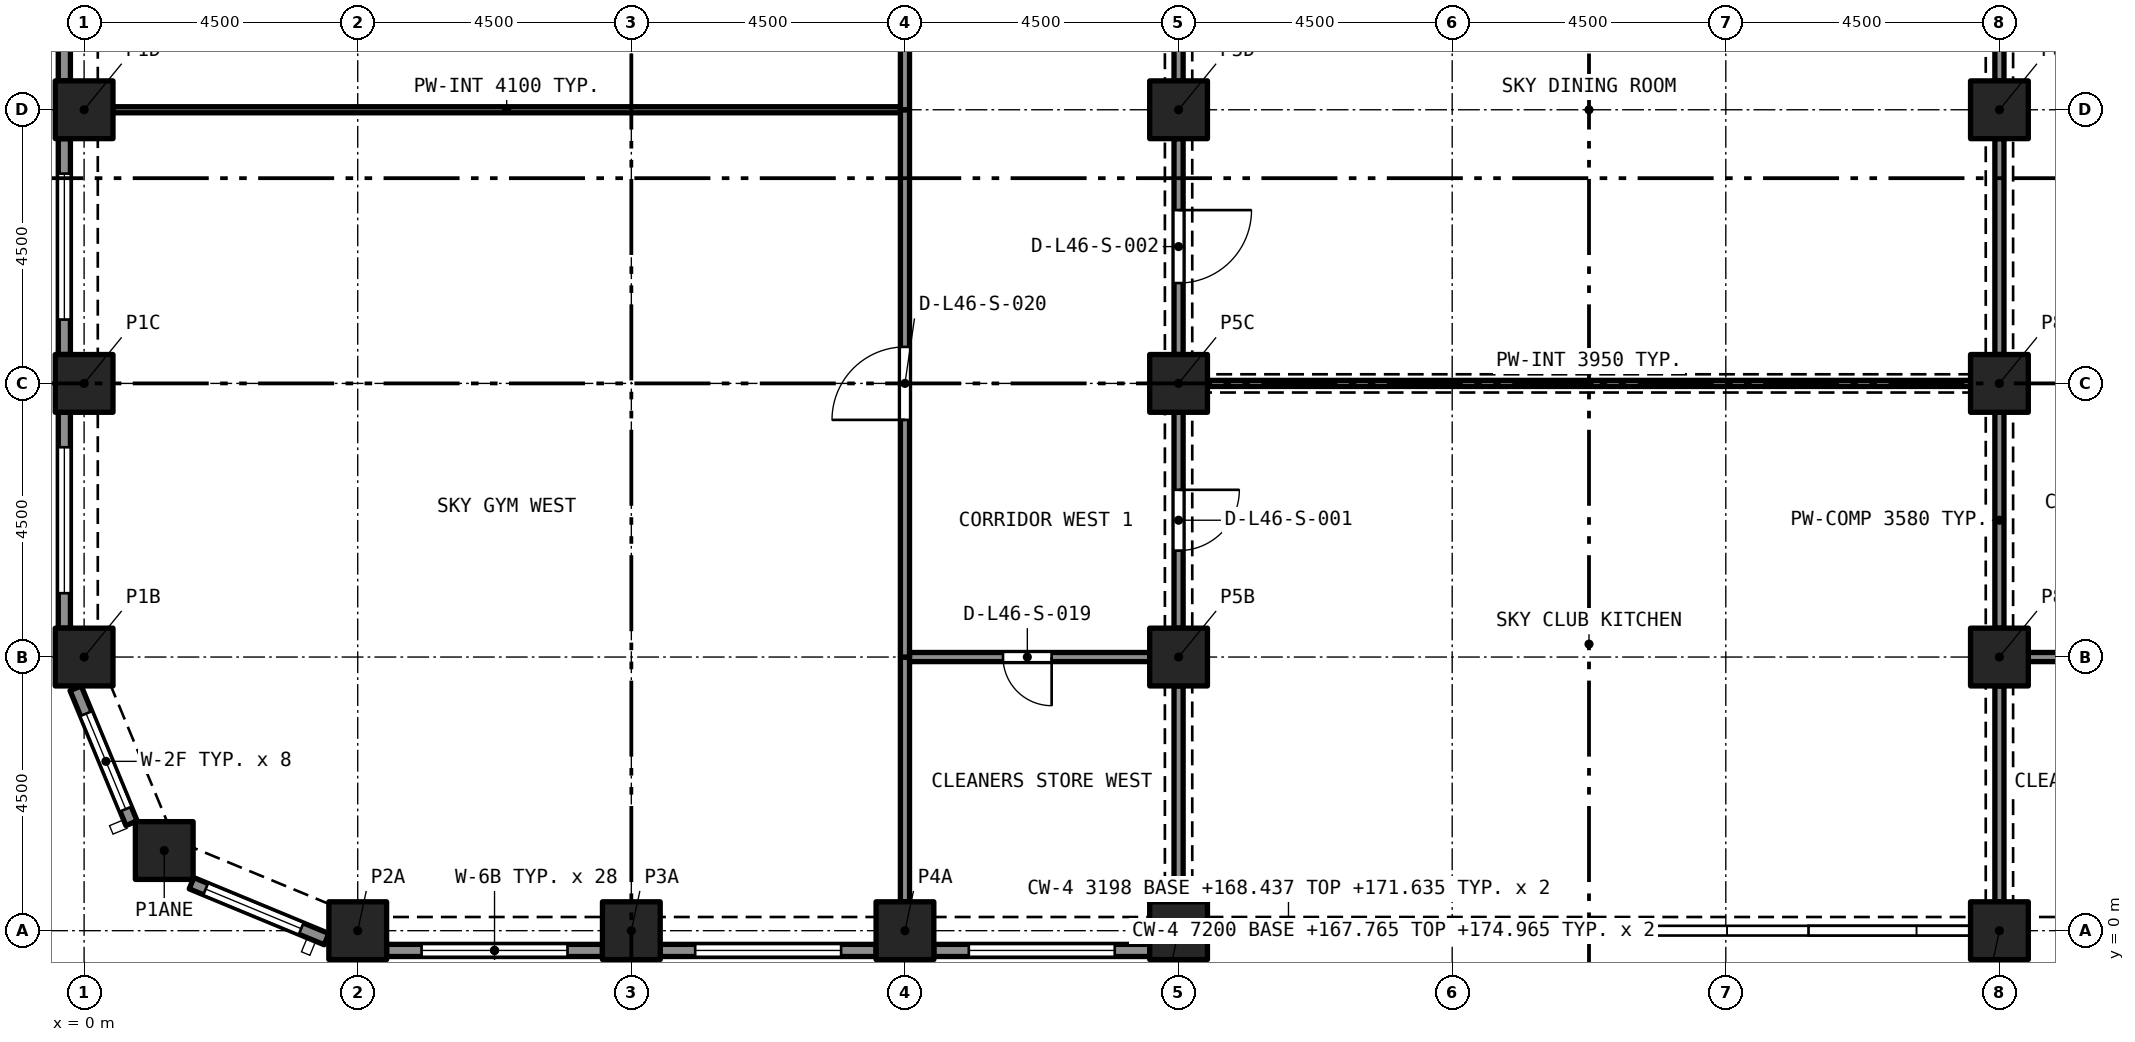
"""IFC4 building model, lengths in metres.
Left out: names, types, materials, properties, quantities, classifications, styles, units other than length and angle.
Written with IfcOpenShell. Run it as: python <this file> out.ifc"""

import sys

from ifc_helpers import new_model, si_unit, direction, frame, frame_2d, origin, origin_2d, place, context, subcontext, project, spatial, rectangle, extrude, element, fill, save


model = new_model("IFC4")
c1 = context("Model", 3, precision=1e-05, world=origin(), true_north=direction((0.0, 1.0)))
c2 = subcontext(c1, "Body", "Model", "MODEL_VIEW")
j1 = project(units=[si_unit("LENGTHUNIT", "METRE"), si_unit("PLANEANGLEUNIT", "RADIAN")], contexts=[c1])
p1 = place(None, origin())
s1 = spatial("IfcSite", under=j1, at=p1, CompositionType="ELEMENT")
p2 = place(p1, origin())
s2 = spatial("IfcBuilding", under=s1, at=p2, CompositionType="ELEMENT")
p3 = place(p2, frame((0.0, 0.0, 168.2)))
s3 = spatial("IfcBuildingStorey", under=s2, at=p3, CompositionType="ELEMENT", Elevation=168.2)
for number, where, z_axis, x_axis in (
    (1, (4.5, 0.0, 0.0), (0.0, 0.0, 1.0), (1.0, 0.0, 0.0)),
    (2, (9.0, 0.0, 0.0), (0.0, 0.0, 1.0), (1.0, 0.0, 0.0)),
    (3, (13.5, 0.0, 0.0), (0.0, 0.0, 1.0), (1.0, 0.0, 0.0)),
    (4, (18.0, 0.0, 0.0), (0.0, 0.0, 1.0), (1.0, 0.0, 0.0)),
    (5, (31.5, 0.0, 0.0), (0.0, 0.0, 1.0), (1.0, 0.0, 0.0)),
    (6, (1.318, 1.318, 0.0), (0.0, 0.0, 1.0), (1.0, 0.0, 0.0)),
    (7, (0.0, 4.5, 0.0), (0.0, 0.0, 1.0), (1.0, 0.0, 0.0)),
    (8, (18.0, 4.5, 0.0), (0.0, 0.0, 1.0), (1.0, 0.0, 0.0)),
    (9, (31.5, 4.5, 0.0), (0.0, 0.0, 1.0), (1.0, 0.0, 0.0)),
    (10, (0.0, 9.0, 0.0), (0.0, 0.0, 1.0), (1.0, 0.0, 0.0)),
    (11, (18.0, 9.0, 0.0), (0.0, 0.0, 1.0), (1.0, 0.0, 0.0)),
    (12, (31.5, 9.0, 0.0), (0.0, 0.0, 1.0), (1.0, 0.0, 0.0)),
    (13, (0.0, 13.5, 0.0), (0.0, 0.0, 1.0), (1.0, 0.0, 0.0)),
    (14, (18.0, 13.5, 0.0), (0.0, 0.0, 1.0), (1.0, 0.0, 0.0)),
    (15, (31.5, 13.5, 0.0), (0.0, 0.0, 1.0), (1.0, 0.0, 0.0)),
):
    element("IfcColumn", number, at=place(p3, frame(where, z_axis=z_axis, x_axis=x_axis)), inside=s3, PredefinedType="COLUMN", context=c2, shape_type="SweptSolid", body=[
        extrude(rectangle(XDim=0.95, YDim=0.95, at=origin_2d()), origin(), (0.0, 0.0, 1.0), 4.4),
    ])
p4 = place(p3, frame((0.78, 1.767, 0.0), z_axis=(0.0, 0.0, 1.0), x_axis=(-0.382680855588, 0.923880599843, 0.0)))
e16 = element("IfcWall", 16, at=p4, inside=s3, PredefinedType="SOLIDWALL", context=c2, shape_type="SweptSolid", body=[
    extrude(rectangle(XDim=2.403, YDim=0.2, at=frame_2d((1.201, 0.0))), origin(), (0.0, 0.0, 1.0), 4.4),
])
p5 = place(p4, frame((0.251, 0.0, 0.45)))
e17 = element("IfcOpeningElement", 17, at=p5, cuts=e16, PredefinedType="OPENING", context=c2, shape_type="SweptSolid", body=[
    extrude(rectangle(XDim=1.7, YDim=2.55, at=frame_2d((0.85, 1.275))), frame((0.0, 0.11, 0.0), z_axis=(0.0, -1.0, 0.0), x_axis=(1.0, 0.0, 0.0)), (0.0, 0.0, 1.0), 0.22),
])
p6 = place(p3, frame((3.987, -0.139, 0.0), z_axis=(0.0, 0.0, 1.0), x_axis=(-0.923880599843, 0.382680855588, 0.0)))
e18 = element("IfcWall", 18, at=p6, inside=s3, PredefinedType="SOLIDWALL", context=c2, shape_type="SweptSolid", body=[
    extrude(rectangle(XDim=2.403, YDim=0.2, at=frame_2d((1.201, 0.0))), origin(), (0.0, 0.0, 1.0), 4.4),
])
p7 = place(p6, frame((0.451, 0.0, 0.45)))
e19 = element("IfcOpeningElement", 19, at=p7, cuts=e18, PredefinedType="OPENING", context=c2, shape_type="SweptSolid", body=[
    extrude(rectangle(XDim=1.7, YDim=2.55, at=frame_2d((0.85, 1.275))), frame((0.0, 0.11, 0.0), z_axis=(0.0, -1.0, 0.0), x_axis=(1.0, 0.0, 0.0)), (0.0, 0.0, 1.0), 0.22),
])
p8 = place(p3, frame((8.525, -0.325, 0.0), z_axis=(0.0, 0.0, 1.0), x_axis=(-1.0, 0.0, 0.0)))
e20 = element("IfcWall", 20, at=p8, inside=s3, PredefinedType="SOLIDWALL", context=c2, shape_type="SweptSolid", body=[
    extrude(rectangle(XDim=3.55, YDim=0.2, at=frame_2d((1.775, 0.0))), origin(), (0.0, 0.0, 1.0), 4.4),
])
p9 = place(p8, frame((0.575, 0.0, 0.45)))
e21 = element("IfcOpeningElement", 21, at=p9, cuts=e20, PredefinedType="OPENING", context=c2, shape_type="SweptSolid", body=[
    extrude(rectangle(XDim=2.4, YDim=2.55, at=frame_2d((1.2, 1.275))), frame((0.0, 0.11, 0.0), z_axis=(0.0, -1.0, 0.0), x_axis=(1.0, 0.0, 0.0)), (0.0, 0.0, 1.0), 0.22),
])
p10 = place(p3, frame((13.025, -0.325, 0.0), z_axis=(0.0, 0.0, 1.0), x_axis=(-1.0, 0.0, 0.0)))
e22 = element("IfcWall", 22, at=p10, inside=s3, PredefinedType="SOLIDWALL", context=c2, shape_type="SweptSolid", body=[
    extrude(rectangle(XDim=3.55, YDim=0.2, at=frame_2d((1.775, 0.0))), origin(), (0.0, 0.0, 1.0), 4.4),
])
p11 = place(p10, frame((0.575, 0.0, 0.45)))
e23 = element("IfcOpeningElement", 23, at=p11, cuts=e22, PredefinedType="OPENING", context=c2, shape_type="SweptSolid", body=[
    extrude(rectangle(XDim=2.4, YDim=2.55, at=frame_2d((1.2, 1.275))), frame((0.0, 0.11, 0.0), z_axis=(0.0, -1.0, 0.0), x_axis=(1.0, 0.0, 0.0)), (0.0, 0.0, 1.0), 0.22),
])
p12 = place(p3, frame((17.525, -0.325, 0.0), z_axis=(0.0, 0.0, 1.0), x_axis=(-1.0, 0.0, 0.0)))
e24 = element("IfcWall", 24, at=p12, inside=s3, PredefinedType="SOLIDWALL", context=c2, shape_type="SweptSolid", body=[
    extrude(rectangle(XDim=3.55, YDim=0.2, at=frame_2d((1.775, 0.0))), origin(), (0.0, 0.0, 1.0), 4.4),
])
p13 = place(p12, frame((0.575, 0.0, 0.45)))
e25 = element("IfcOpeningElement", 25, at=p13, cuts=e24, PredefinedType="OPENING", context=c2, shape_type="SweptSolid", body=[
    extrude(rectangle(XDim=2.4, YDim=2.55, at=frame_2d((1.2, 1.275))), frame((0.0, 0.11, 0.0), z_axis=(0.0, -1.0, 0.0), x_axis=(1.0, 0.0, 0.0)), (0.0, 0.0, 1.0), 0.22),
])
p14 = place(p3, frame((-0.325, 13.975, 0.0), z_axis=(0.0, 0.0, 1.0), x_axis=(0.0, 1.0, 0.0)))
e26 = element("IfcWall", 26, at=p14, inside=s3, PredefinedType="SOLIDWALL", context=c2, shape_type="SweptSolid", body=[
    extrude(rectangle(XDim=3.55, YDim=0.2, at=frame_2d((1.775, 0.0))), origin(), (0.0, 0.0, 1.0), 4.4),
])
p15 = place(p14, frame((0.575, 0.0, 0.45)))
e27 = element("IfcOpeningElement", 27, at=p15, cuts=e26, PredefinedType="OPENING", context=c2, shape_type="SweptSolid", body=[
    extrude(rectangle(XDim=2.4, YDim=2.55, at=frame_2d((1.2, 1.275))), frame((0.0, 0.11, 0.0), z_axis=(0.0, -1.0, 0.0), x_axis=(1.0, 0.0, 0.0)), (0.0, 0.0, 1.0), 0.22),
])
p16 = place(p3, frame((-0.325, 9.475, 0.0), z_axis=(0.0, 0.0, 1.0), x_axis=(0.0, 1.0, 0.0)))
e28 = element("IfcWall", 28, at=p16, inside=s3, PredefinedType="SOLIDWALL", context=c2, shape_type="SweptSolid", body=[
    extrude(rectangle(XDim=3.55, YDim=0.2, at=frame_2d((1.775, 0.0))), origin(), (0.0, 0.0, 1.0), 4.4),
])
p17 = place(p16, frame((0.575, 0.0, 0.45)))
e29 = element("IfcOpeningElement", 29, at=p17, cuts=e28, PredefinedType="OPENING", context=c2, shape_type="SweptSolid", body=[
    extrude(rectangle(XDim=2.4, YDim=2.55, at=frame_2d((1.2, 1.275))), frame((0.0, 0.11, 0.0), z_axis=(0.0, -1.0, 0.0), x_axis=(1.0, 0.0, 0.0)), (0.0, 0.0, 1.0), 0.22),
])
p18 = place(p3, frame((-0.325, 4.975, 0.0), z_axis=(0.0, 0.0, 1.0), x_axis=(0.0, 1.0, 0.0)))
e30 = element("IfcWall", 30, at=p18, inside=s3, PredefinedType="SOLIDWALL", context=c2, shape_type="SweptSolid", body=[
    extrude(rectangle(XDim=3.55, YDim=0.2, at=frame_2d((1.775, 0.0))), origin(), (0.0, 0.0, 1.0), 4.4),
])
p19 = place(p18, frame((0.575, 0.0, 0.45)))
e31 = element("IfcOpeningElement", 31, at=p19, cuts=e30, PredefinedType="OPENING", context=c2, shape_type="SweptSolid", body=[
    extrude(rectangle(XDim=2.4, YDim=2.55, at=frame_2d((1.2, 1.275))), frame((0.0, 0.11, 0.0), z_axis=(0.0, -1.0, 0.0), x_axis=(1.0, 0.0, 0.0)), (0.0, 0.0, 1.0), 0.22),
])
p20 = place(p3, frame((18.475, 9.0, 0.0), z_axis=(0.0, 0.0, 1.0), x_axis=(1.0, 0.0, 0.0)))
e32 = element("IfcWall", 32, at=p20, inside=s3, PredefinedType="PARTITIONING", context=c2, shape_type="SweptSolid", body=[
    extrude(rectangle(XDim=12.55, YDim=0.1, at=frame_2d((6.275, 0.0))), origin(), (0.0, 0.0, 1.0), 3.95),
])
for number, where, z_axis, x_axis in (
    (33, (31.5, 0.475, 0.0), (0.0, 0.0, 1.0), (0.0, 1.0, 0.0)),
    (34, (31.5, 4.975, 0.0), (0.0, 0.0, 1.0), (0.0, 1.0, 0.0)),
    (35, (18.0, 0.475, 0.0), (0.0, 0.0, 1.0), (0.0, 1.0, 0.0)),
):
    element("IfcWall", number, at=place(p3, frame(where, z_axis=z_axis, x_axis=x_axis)), inside=s3, PredefinedType="PARTITIONING", context=c2, shape_type="SweptSolid", body=[
        extrude(rectangle(XDim=3.55, YDim=0.15, at=frame_2d((1.775, 0.0))), origin(), (0.0, 0.0, 1.0), 3.58),
    ])
p21 = place(p3, frame((18.0, 8.525, 0.0), z_axis=(0.0, 0.0, 1.0), x_axis=(0.0, -1.0, 0.0)))
e36 = element("IfcWall", 36, at=p21, inside=s3, PredefinedType="PARTITIONING", context=c2, shape_type="SweptSolid", body=[
    extrude(rectangle(XDim=3.55, YDim=0.15, at=frame_2d((1.775, 0.0))), origin(), (0.0, 0.0, 1.0), 3.58),
])
p22 = place(p21, frame((1.275, 0.0, 0.0)))
e37 = element("IfcOpeningElement", 37, at=p22, cuts=e36, PredefinedType="OPENING", context=c2, shape_type="SweptSolid", body=[
    extrude(rectangle(XDim=1.0, YDim=2.1, at=frame_2d((0.5, 1.05))), frame((0.0, 0.085, 0.0), z_axis=(0.0, -1.0, 0.0), x_axis=(1.0, 0.0, 0.0)), (0.0, 0.0, 1.0), 0.17),
])
for number, where, z_axis, x_axis in (
    (38, (31.5, 13.975, 0.0), (0.0, 0.0, 1.0), (0.0, 1.0, 0.0)),
    (39, (31.5, 9.475, 0.0), (0.0, 0.0, 1.0), (0.0, 1.0, 0.0)),
):
    element("IfcWall", number, at=place(p3, frame(where, z_axis=z_axis, x_axis=x_axis)), inside=s3, PredefinedType="PARTITIONING", context=c2, shape_type="SweptSolid", body=[
        extrude(rectangle(XDim=3.55, YDim=0.15, at=frame_2d((1.775, 0.0))), origin(), (0.0, 0.0, 1.0), 3.58),
    ])
p23 = place(p3, frame((18.0, 13.025, 0.0), z_axis=(0.0, 0.0, 1.0), x_axis=(0.0, -1.0, 0.0)))
e40 = element("IfcWall", 40, at=p23, inside=s3, PredefinedType="PARTITIONING", context=c2, shape_type="SweptSolid", body=[
    extrude(rectangle(XDim=3.55, YDim=0.15, at=frame_2d((1.775, 0.0))), origin(), (0.0, 0.0, 1.0), 3.58),
])
p24 = place(p23, frame((1.175, 0.0, 0.0)))
e41 = element("IfcOpeningElement", 41, at=p24, cuts=e40, PredefinedType="OPENING", context=c2, shape_type="SweptSolid", body=[
    extrude(rectangle(XDim=1.2, YDim=2.1, at=frame_2d((0.6, 1.05))), frame((0.0, 0.085, 0.0), z_axis=(0.0, -1.0, 0.0), x_axis=(1.0, 0.0, 0.0)), (0.0, 0.0, 1.0), 0.17),
])
p25 = place(p3, frame((18.0, 13.975, 0.0), z_axis=(0.0, 0.0, 1.0), x_axis=(0.0, 1.0, 0.0)))
e42 = element("IfcWall", 42, at=p25, inside=s3, PredefinedType="PARTITIONING", context=c2, shape_type="SweptSolid", body=[
    extrude(rectangle(XDim=3.55, YDim=0.15, at=frame_2d((1.775, 0.0))), origin(), (0.0, 0.0, 1.0), 3.58),
])
p26 = place(p3, frame((35.925, 4.5, 0.0), z_axis=(0.0, 0.0, 1.0), x_axis=(-1.0, 0.0, 0.0)))
e43 = element("IfcWall", 43, at=p26, inside=s3, PredefinedType="PARTITIONING", context=c2, shape_type="SweptSolid", body=[
    extrude(rectangle(XDim=3.95, YDim=0.15, at=frame_2d((1.975, 0.0))), origin(), (0.0, 0.0, 1.0), 4.1),
])
p27 = place(p26, frame((1.538, 0.0, 0.0)))
e44 = element("IfcOpeningElement", 44, at=p27, cuts=e43, PredefinedType="OPENING", context=c2, shape_type="SweptSolid", body=[
    extrude(rectangle(XDim=0.8, YDim=2.1, at=frame_2d((0.4, 1.05))), frame((0.0, 0.085, 0.0), z_axis=(0.0, -1.0, 0.0), x_axis=(1.0, 0.0, 0.0)), (0.0, 0.0, 1.0), 0.17),
])
p28 = place(p3, frame((13.5, 0.475, 0.0), z_axis=(0.0, 0.0, 1.0), x_axis=(0.0, 1.0, 0.0)))
e45 = element("IfcWall", 45, at=p28, inside=s3, PredefinedType="PARTITIONING", context=c2, shape_type="SweptSolid", body=[
    extrude(rectangle(XDim=4.025, YDim=0.15, at=frame_2d((2.012, 0.0))), origin(), (0.0, 0.0, 1.0), 4.1),
])
p29 = place(p3, frame((17.525, 4.5, 0.0), z_axis=(0.0, 0.0, 1.0), x_axis=(-1.0, 0.0, 0.0)))
e46 = element("IfcWall", 46, at=p29, inside=s3, PredefinedType="PARTITIONING", context=c2, shape_type="SweptSolid", body=[
    extrude(rectangle(XDim=3.95, YDim=0.15, at=frame_2d((1.975, 0.0))), origin(), (0.0, 0.0, 1.0), 4.1),
])
p30 = place(p29, frame((1.613, 0.0, 0.0)))
e47 = element("IfcOpeningElement", 47, at=p30, cuts=e46, PredefinedType="OPENING", context=c2, shape_type="SweptSolid", body=[
    extrude(rectangle(XDim=0.8, YDim=2.1, at=frame_2d((0.4, 1.05))), frame((0.0, 0.085, 0.0), z_axis=(0.0, -1.0, 0.0), x_axis=(1.0, 0.0, 0.0)), (0.0, 0.0, 1.0), 0.17),
])
p31 = place(p3, frame((13.5, 4.5, 0.0), z_axis=(0.0, 0.0, 1.0), x_axis=(0.0, 1.0, 0.0)))
e48 = element("IfcWall", 48, at=p31, inside=s3, PredefinedType="PARTITIONING", context=c2, shape_type="SweptSolid", body=[
    extrude(rectangle(XDim=9.0, YDim=0.15, at=frame_2d((4.5, 0.0))), origin(), (0.0, 0.0, 1.0), 4.1),
])
p32 = place(p31, frame((3.9, 0.0, 0.0)))
e49 = element("IfcOpeningElement", 49, at=p32, cuts=e48, PredefinedType="OPENING", context=c2, shape_type="SweptSolid", body=[
    extrude(rectangle(XDim=1.2, YDim=2.1, at=frame_2d((0.6, 1.05))), frame((0.0, 0.085, 0.0), z_axis=(0.0, -1.0, 0.0), x_axis=(1.0, 0.0, 0.0)), (0.0, 0.0, 1.0), 0.17),
])
p33 = place(p3, frame((13.5, 13.5, 0.0), z_axis=(0.0, 0.0, 1.0), x_axis=(0.0, 1.0, 0.0)))
e50 = element("IfcWall", 50, at=p33, inside=s3, PredefinedType="PARTITIONING", context=c2, shape_type="SweptSolid", body=[
    extrude(rectangle(XDim=8.525, YDim=0.15, at=frame_2d((4.262, 0.0))), origin(), (0.0, 0.0, 1.0), 4.1),
])
p34 = place(p33, frame((3.663, 0.0, 0.0)))
e51 = element("IfcOpeningElement", 51, at=p34, cuts=e50, PredefinedType="OPENING", context=c2, shape_type="SweptSolid", body=[
    extrude(rectangle(XDim=1.2, YDim=2.1, at=frame_2d((0.6, 1.05))), frame((0.0, 0.085, 0.0), z_axis=(0.0, -1.0, 0.0), x_axis=(1.0, 0.0, 0.0)), (0.0, 0.0, 1.0), 0.17),
])
p35 = place(p3, frame((0.475, 13.5, 0.0), z_axis=(0.0, 0.0, 1.0), x_axis=(1.0, 0.0, 0.0)))
e52 = element("IfcWall", 52, at=p35, inside=s3, PredefinedType="PARTITIONING", context=c2, shape_type="SweptSolid", body=[
    extrude(rectangle(XDim=12.95, YDim=0.1, at=frame_2d((6.475, 0.0))), origin(), (0.0, 0.0, 1.0), 4.1),
])
p36 = place(p5, origin())
e53 = element("IfcWindow", 53, at=p36, inside=s3, PartitioningType="SINGLE_PANEL", PredefinedType="WINDOW", context=c2, shape_type="SweptSolid", body=[
    extrude(rectangle(XDim=1.7, YDim=2.55, at=frame_2d((0.85, 1.275))), frame((0.0, 0.03, 0.0), z_axis=(0.0, -1.0, 0.0), x_axis=(1.0, 0.0, 0.0)), (0.0, 0.0, 1.0), 0.06),
])
fill(e17, e53)
p37 = place(p7, origin())
e54 = element("IfcWindow", 54, at=p37, inside=s3, PartitioningType="SINGLE_PANEL", PredefinedType="WINDOW", context=c2, shape_type="SweptSolid", body=[
    extrude(rectangle(XDim=1.7, YDim=2.55, at=frame_2d((0.85, 1.275))), frame((0.0, 0.03, 0.0), z_axis=(0.0, -1.0, 0.0), x_axis=(1.0, 0.0, 0.0)), (0.0, 0.0, 1.0), 0.06),
])
fill(e19, e54)
p38 = place(p9, origin())
e55 = element("IfcWindow", 55, at=p38, inside=s3, PartitioningType="SINGLE_PANEL", PredefinedType="WINDOW", context=c2, shape_type="SweptSolid", body=[
    extrude(rectangle(XDim=2.4, YDim=2.55, at=frame_2d((1.2, 1.275))), frame((0.0, 0.03, 0.0), z_axis=(0.0, -1.0, 0.0), x_axis=(1.0, 0.0, 0.0)), (0.0, 0.0, 1.0), 0.06),
])
fill(e21, e55)
p39 = place(p11, origin())
e56 = element("IfcWindow", 56, at=p39, inside=s3, PartitioningType="SINGLE_PANEL", PredefinedType="WINDOW", context=c2, shape_type="SweptSolid", body=[
    extrude(rectangle(XDim=2.4, YDim=2.55, at=frame_2d((1.2, 1.275))), frame((0.0, 0.03, 0.0), z_axis=(0.0, -1.0, 0.0), x_axis=(1.0, 0.0, 0.0)), (0.0, 0.0, 1.0), 0.06),
])
fill(e23, e56)
p40 = place(p13, origin())
e57 = element("IfcWindow", 57, at=p40, inside=s3, PartitioningType="SINGLE_PANEL", PredefinedType="WINDOW", context=c2, shape_type="SweptSolid", body=[
    extrude(rectangle(XDim=2.4, YDim=2.55, at=frame_2d((1.2, 1.275))), frame((0.0, 0.03, 0.0), z_axis=(0.0, -1.0, 0.0), x_axis=(1.0, 0.0, 0.0)), (0.0, 0.0, 1.0), 0.06),
])
fill(e25, e57)
p41 = place(p17, origin())
e58 = element("IfcWindow", 58, at=p41, inside=s3, PartitioningType="SINGLE_PANEL", PredefinedType="WINDOW", context=c2, shape_type="SweptSolid", body=[
    extrude(rectangle(XDim=2.4, YDim=2.55, at=frame_2d((1.2, 1.275))), frame((0.0, 0.03, 0.0), z_axis=(0.0, -1.0, 0.0), x_axis=(1.0, 0.0, 0.0)), (0.0, 0.0, 1.0), 0.06),
])
fill(e29, e58)
p42 = place(p19, origin())
e59 = element("IfcWindow", 59, at=p42, inside=s3, PartitioningType="SINGLE_PANEL", PredefinedType="WINDOW", context=c2, shape_type="SweptSolid", body=[
    extrude(rectangle(XDim=2.4, YDim=2.55, at=frame_2d((1.2, 1.275))), frame((0.0, 0.03, 0.0), z_axis=(0.0, -1.0, 0.0), x_axis=(1.0, 0.0, 0.0)), (0.0, 0.0, 1.0), 0.06),
])
fill(e31, e59)
p43 = place(p22, origin())
e60 = element("IfcDoor", 60, at=p43, inside=s3, OperationType="SINGLE_SWING_RIGHT", PredefinedType="DOOR", context=c2, shape_type="SweptSolid", body=[
    extrude(rectangle(XDim=1.0, YDim=2.1, at=frame_2d((0.5, 1.05))), frame((0.0, 0.025, 0.0), z_axis=(0.0, -1.0, 0.0), x_axis=(1.0, 0.0, 0.0)), (0.0, 0.0, 1.0), 0.05),
])
fill(e37, e60)
p44 = place(p24, origin())
e61 = element("IfcDoor", 61, at=p44, inside=s3, OperationType="SINGLE_SWING_LEFT", PredefinedType="DOOR", context=c2, shape_type="SweptSolid", body=[
    extrude(rectangle(XDim=1.2, YDim=2.1, at=frame_2d((0.6, 1.05))), frame((0.0, 0.025, 0.0), z_axis=(0.0, -1.0, 0.0), x_axis=(1.0, 0.0, 0.0)), (0.0, 0.0, 1.0), 0.05),
])
fill(e41, e61)
p45 = place(p30, origin())
e62 = element("IfcDoor", 62, at=p45, inside=s3, OperationType="SINGLE_SWING_RIGHT", PredefinedType="DOOR", context=c2, shape_type="SweptSolid", body=[
    extrude(rectangle(XDim=0.8, YDim=2.1, at=frame_2d((0.4, 1.05))), frame((0.0, 0.025, 0.0), z_axis=(0.0, -1.0, 0.0), x_axis=(1.0, 0.0, 0.0)), (0.0, 0.0, 1.0), 0.05),
])
fill(e47, e62)
p46 = place(p32, origin())
e63 = element("IfcDoor", 63, at=p46, inside=s3, OperationType="SINGLE_SWING_RIGHT", PredefinedType="DOOR", context=c2, shape_type="SweptSolid", body=[
    extrude(rectangle(XDim=1.2, YDim=2.1, at=frame_2d((0.6, 1.05))), frame((0.0, 0.025, 0.0), z_axis=(0.0, -1.0, 0.0), x_axis=(1.0, 0.0, 0.0)), (0.0, 0.0, 1.0), 0.05),
])
fill(e49, e63)
save(model, sys.argv[1])
